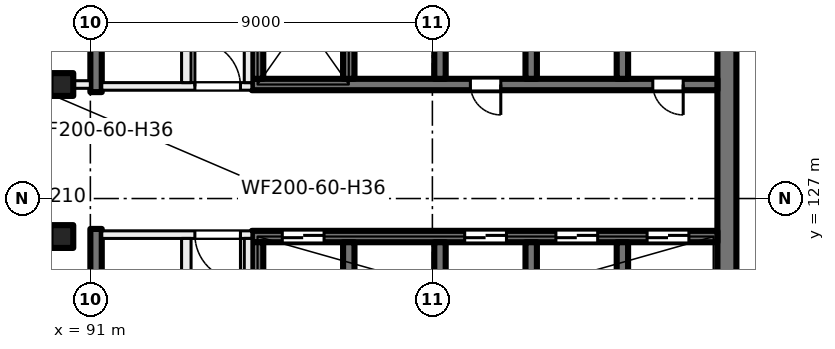
"""IFC4 building model, lengths in metres.
Left out: names, types, materials, properties, quantities, classifications, styles, units other than length and angle.
Written with IfcOpenShell. Run it as: python <this file> out.ifc"""

import sys

from ifc_helpers import new_model, si_unit, direction, frame, frame_2d, origin, origin_2d, place, context, subcontext, project, spatial, rectangle, extrude, element, fill, save


model = new_model("IFC4")
c1 = context("Model", 3, precision=1e-05, world=origin(), true_north=direction((0.0, 1.0)))
c2 = subcontext(c1, "Body", "Model", "MODEL_VIEW")
j1 = project(units=[si_unit("LENGTHUNIT", "METRE"), si_unit("PLANEANGLEUNIT", "RADIAN")], contexts=[c1])
p1 = place(None, origin())
s1 = spatial("IfcSite", under=j1, at=p1, CompositionType="ELEMENT")
p2 = place(p1, origin())
s2 = spatial("IfcBuilding", under=s1, at=p2, CompositionType="ELEMENT")
p3 = place(p2, frame((0.0, 0.0, 212.0)))
s3 = spatial("IfcBuildingStorey", under=s2, at=p3, CompositionType="ELEMENT", Elevation=212.0)
for number, where, z_axis, x_axis in (
    (1, (90.25, 130.0, 0.0), (0.0, 0.0, 1.0), (1.0, 0.0, 0.0)),
    (2, (90.25, 126.0, 0.0), (0.0, 0.0, 1.0), (1.0, 0.0, 0.0)),
):
    element("IfcColumn", number, at=place(p3, frame(where, z_axis=z_axis, x_axis=x_axis)), inside=s3, PredefinedType="COLUMN", context=c2, shape_type="SweptSolid", body=[
        extrude(rectangle(XDim=0.6, YDim=0.6, at=origin_2d()), origin(), (0.0, 0.0, 1.0), 4.0),
    ])
p4 = place(p3, frame((107.75, 135.2, 0.0), z_axis=(0.0, 0.0, 1.0), x_axis=(0.0, -1.0, 0.0)))
e3 = element("IfcWall", 3, at=p4, inside=s3, PredefinedType="SHEAR", context=c2, shape_type="SweptSolid", body=[
    extrude(rectangle(XDim=14.4, YDim=0.5, at=frame_2d((7.2, 0.0))), origin(), (0.0, 0.0, 1.0), 4.0),
])
p5 = place(p3, frame((107.5, 130.0, 0.0), z_axis=(0.0, 0.0, 1.0), x_axis=(-1.0, 0.0, 0.0)))
e4 = element("IfcWall", 4, at=p5, inside=s3, PredefinedType="SHEAR", context=c2, shape_type="SweptSolid", body=[
    extrude(rectangle(XDim=12.25, YDim=0.3, at=frame_2d((6.125, 0.0))), origin(), (0.0, 0.0, 1.0), 4.0),
])
p6 = place(p5, frame((0.9, 0.0, 0.0)))
e5 = element("IfcOpeningElement", 5, at=p6, cuts=e4, PredefinedType="OPENING", context=c2, shape_type="SweptSolid", body=[
    extrude(rectangle(XDim=0.8, YDim=2.1, at=frame_2d((0.4, 1.05))), frame((0.0, 0.16, 0.0), z_axis=(0.0, -1.0, 0.0), x_axis=(1.0, 0.0, 0.0)), (0.0, 0.0, 1.0), 0.32),
])
p7 = place(p5, frame((5.7, 0.0, 0.0)))
e6 = element("IfcOpeningElement", 6, at=p7, cuts=e4, PredefinedType="OPENING", context=c2, shape_type="SweptSolid", body=[
    extrude(rectangle(XDim=0.8, YDim=2.1, at=frame_2d((0.4, 1.05))), frame((0.0, 0.16, 0.0), z_axis=(0.0, -1.0, 0.0), x_axis=(1.0, 0.0, 0.0)), (0.0, 0.0, 1.0), 0.32),
])
for number, where, z_axis, x_axis in (
    (7, (105.0, 133.25, 0.0), (0.0, 0.0, 1.0), (0.0, -1.0, 0.0)),
    (8, (102.6, 133.25, 0.0), (0.0, 0.0, 1.0), (0.0, -1.0, 0.0)),
    (9, (100.2, 133.25, 0.0), (0.0, 0.0, 1.0), (0.0, -1.0, 0.0)),
    (10, (97.8, 133.25, 0.0), (0.0, 0.0, 1.0), (0.0, -1.0, 0.0)),
    (11, (95.4, 133.25, 0.0), (0.0, 0.0, 1.0), (0.0, -1.0, 0.0)),
):
    element("IfcWall", number, at=place(p3, frame(where, z_axis=z_axis, x_axis=x_axis)), inside=s3, PredefinedType="SHEAR", context=c2, shape_type="SweptSolid", body=[
        extrude(rectangle(XDim=3.1, YDim=0.3, at=frame_2d((1.55, 0.0))), origin(), (0.0, 0.0, 1.0), 4.0),
    ])
p8 = place(p3, frame((107.5, 126.0, 0.0), z_axis=(0.0, 0.0, 1.0), x_axis=(-1.0, 0.0, 0.0)))
e12 = element("IfcWall", 12, at=p8, inside=s3, PredefinedType="SHEAR", context=c2, shape_type="SweptSolid", body=[
    extrude(rectangle(XDim=12.25, YDim=0.3, at=frame_2d((6.125, 0.0))), origin(), (0.0, 0.0, 1.0), 4.0),
])
p9 = place(p8, frame((0.75, 0.0, 0.0)))
e13 = element("IfcOpeningElement", 13, at=p9, cuts=e12, PredefinedType="OPENING", context=c2, shape_type="SweptSolid", body=[
    extrude(rectangle(XDim=1.1, YDim=2.1, at=frame_2d((0.55, 1.05))), frame((0.0, 0.16, 0.0), z_axis=(0.0, -1.0, 0.0), x_axis=(1.0, 0.0, 0.0)), (0.0, 0.0, 1.0), 0.32),
])
p10 = place(p8, frame((3.15, 0.0, 0.0)))
e14 = element("IfcOpeningElement", 14, at=p10, cuts=e12, PredefinedType="OPENING", context=c2, shape_type="SweptSolid", body=[
    extrude(rectangle(XDim=1.1, YDim=2.1, at=frame_2d((0.55, 1.05))), frame((0.0, 0.16, 0.0), z_axis=(0.0, -1.0, 0.0), x_axis=(1.0, 0.0, 0.0)), (0.0, 0.0, 1.0), 0.32),
])
p11 = place(p8, frame((5.55, 0.0, 0.0)))
e15 = element("IfcOpeningElement", 15, at=p11, cuts=e12, PredefinedType="OPENING", context=c2, shape_type="SweptSolid", body=[
    extrude(rectangle(XDim=1.1, YDim=2.1, at=frame_2d((0.55, 1.05))), frame((0.0, 0.16, 0.0), z_axis=(0.0, -1.0, 0.0), x_axis=(1.0, 0.0, 0.0)), (0.0, 0.0, 1.0), 0.32),
])
p12 = place(p8, frame((10.35, 0.0, 0.0)))
e16 = element("IfcOpeningElement", 16, at=p12, cuts=e12, PredefinedType="OPENING", context=c2, shape_type="SweptSolid", body=[
    extrude(rectangle(XDim=1.1, YDim=2.1, at=frame_2d((0.55, 1.05))), frame((0.0, 0.16, 0.0), z_axis=(0.0, -1.0, 0.0), x_axis=(1.0, 0.0, 0.0)), (0.0, 0.0, 1.0), 0.32),
])
for number, where, z_axis, x_axis in (
    (17, (105.0, 125.85, 0.0), (0.0, 0.0, 1.0), (0.0, -1.0, 0.0)),
    (18, (102.6, 125.85, 0.0), (0.0, 0.0, 1.0), (0.0, -1.0, 0.0)),
    (19, (100.2, 125.85, 0.0), (0.0, 0.0, 1.0), (0.0, -1.0, 0.0)),
    (20, (97.8, 125.85, 0.0), (0.0, 0.0, 1.0), (0.0, -1.0, 0.0)),
    (21, (95.4, 125.85, 0.0), (0.0, 0.0, 1.0), (0.0, -1.0, 0.0)),
):
    element("IfcWall", number, at=place(p3, frame(where, z_axis=z_axis, x_axis=x_axis)), inside=s3, PredefinedType="SHEAR", context=c2, shape_type="SweptSolid", body=[
        extrude(rectangle(XDim=3.1, YDim=0.3, at=frame_2d((1.55, 0.0))), origin(), (0.0, 0.0, 1.0), 4.0),
    ])
for number, where, z_axis, x_axis in (
    (22, (91.15, 138.5, 0.0), (0.0, 0.0, 1.0), (0.0, -1.0, 0.0)),
    (23, (91.15, 126.2, 0.0), (0.0, 0.0, 1.0), (0.0, -1.0, 0.0)),
):
    element("IfcWall", number, at=place(p3, frame(where, z_axis=z_axis, x_axis=x_axis)), inside=s3, PredefinedType="SHEAR", context=c2, shape_type="SweptSolid", body=[
        extrude(rectangle(XDim=8.7, YDim=0.3, at=frame_2d((4.35, 0.0))), origin(), (0.0, 0.0, 1.0), 4.0),
    ])
p13 = place(p3, frame((95.25, 126.05, 0.0), z_axis=(0.0, 0.0, 1.0), x_axis=(-1.0, 0.0, 0.0)))
e24 = element("IfcWall", 24, at=p13, inside=s3, PredefinedType="PARTITIONING", context=c2, shape_type="SweptSolid", body=[
    extrude(rectangle(XDim=3.95, YDim=0.2, at=frame_2d((1.975, 0.0))), origin(), (0.0, 0.0, 1.0), 3.625),
])
p14 = place(p13, frame((0.3, 0.0, 0.0)))
e25 = element("IfcOpeningElement", 25, at=p14, cuts=e24, PredefinedType="OPENING", context=c2, shape_type="SweptSolid", body=[
    extrude(rectangle(XDim=1.2, YDim=2.1, at=frame_2d((0.6, 1.05))), frame((0.0, 0.11, 0.0), z_axis=(0.0, -1.0, 0.0), x_axis=(1.0, 0.0, 0.0)), (0.0, 0.0, 1.0), 0.22),
])
p15 = place(p3, frame((95.15, 117.5, 0.0), z_axis=(0.0, 0.0, 1.0), x_axis=(0.0, 1.0, 0.0)))
e26 = element("IfcWall", 26, at=p15, inside=s3, PredefinedType="PARTITIONING", context=c2, shape_type="SweptSolid", body=[
    extrude(rectangle(XDim=8.45, YDim=0.2, at=frame_2d((4.225, 0.0))), origin(), (0.0, 0.0, 1.0), 3.625),
])
p16 = place(p15, frame((1.725, 0.0, 0.0)))
e27 = element("IfcOpeningElement", 27, at=p16, cuts=e26, PredefinedType="OPENING", context=c2, shape_type="SweptSolid", body=[
    extrude(rectangle(XDim=1.5, YDim=2.1, at=frame_2d((0.75, 1.05))), frame((0.0, 0.11, 0.0), z_axis=(0.0, -1.0, 0.0), x_axis=(1.0, 0.0, 0.0)), (0.0, 0.0, 1.0), 0.22),
])
p17 = place(p3, frame((93.525, 117.5, 0.0), z_axis=(0.0, 0.0, 1.0), x_axis=(0.0, 1.0, 0.0)))
e28 = element("IfcWall", 28, at=p17, inside=s3, PredefinedType="PARTITIONING", context=c2, shape_type="SweptSolid", body=[
    extrude(rectangle(XDim=8.45, YDim=0.25, at=frame_2d((4.225, 0.0))), origin(), (0.0, 0.0, 1.0), 3.625),
])
p18 = place(p17, frame((5.26, 0.0, 0.0)))
e29 = element("IfcOpeningElement", 29, at=p18, cuts=e28, PredefinedType="OPENING", context=c2, shape_type="SweptSolid", body=[
    extrude(rectangle(XDim=0.8, YDim=2.1, at=frame_2d((0.4, 1.05))), frame((0.0, 0.135, 0.0), z_axis=(0.0, -1.0, 0.0), x_axis=(1.0, 0.0, 0.0)), (0.0, 0.0, 1.0), 0.27),
])
p19 = place(p17, frame((0.885, 0.0, 0.0)))
e30 = element("IfcOpeningElement", 30, at=p19, cuts=e28, PredefinedType="OPENING", context=c2, shape_type="SweptSolid", body=[
    extrude(rectangle(XDim=1.0, YDim=2.1, at=frame_2d((0.5, 1.05))), frame((0.0, 0.135, 0.0), z_axis=(0.0, -1.0, 0.0), x_axis=(1.0, 0.0, 0.0)), (0.0, 0.0, 1.0), 0.27),
])
p20 = place(p3, frame((91.3, 129.95, 0.0), z_axis=(0.0, 0.0, 1.0), x_axis=(1.0, 0.0, 0.0)))
e31 = element("IfcWall", 31, at=p20, inside=s3, PredefinedType="PARTITIONING", context=c2, shape_type="SweptSolid", body=[
    extrude(rectangle(XDim=3.95, YDim=0.2, at=frame_2d((1.975, 0.0))), origin(), (0.0, 0.0, 1.0), 3.625),
])
p21 = place(p20, frame((2.45, 0.0, 0.0)))
e32 = element("IfcOpeningElement", 32, at=p21, cuts=e31, PredefinedType="OPENING", context=c2, shape_type="SweptSolid", body=[
    extrude(rectangle(XDim=1.2, YDim=2.1, at=frame_2d((0.6, 1.05))), frame((0.0, 0.11, 0.0), z_axis=(0.0, -1.0, 0.0), x_axis=(1.0, 0.0, 0.0)), (0.0, 0.0, 1.0), 0.22),
])
p22 = place(p3, frame((95.15, 130.05, 0.0), z_axis=(0.0, 0.0, 1.0), x_axis=(0.0, 1.0, 0.0)))
e33 = element("IfcWall", 33, at=p22, inside=s3, PredefinedType="PARTITIONING", context=c2, shape_type="SweptSolid", body=[
    extrude(rectangle(XDim=8.45, YDim=0.2, at=frame_2d((4.225, 0.0))), origin(), (0.0, 0.0, 1.0), 3.625),
])
p23 = place(p22, frame((5.225, 0.0, 0.0)))
e34 = element("IfcOpeningElement", 34, at=p23, cuts=e33, PredefinedType="OPENING", context=c2, shape_type="SweptSolid", body=[
    extrude(rectangle(XDim=1.5, YDim=2.1, at=frame_2d((0.75, 1.05))), frame((0.0, 0.11, 0.0), z_axis=(0.0, -1.0, 0.0), x_axis=(1.0, 0.0, 0.0)), (0.0, 0.0, 1.0), 0.22),
])
p24 = place(p3, frame((93.525, 130.05, 0.0), z_axis=(0.0, 0.0, 1.0), x_axis=(0.0, 1.0, 0.0)))
e35 = element("IfcWall", 35, at=p24, inside=s3, PredefinedType="PARTITIONING", context=c2, shape_type="SweptSolid", body=[
    extrude(rectangle(XDim=8.45, YDim=0.25, at=frame_2d((4.225, 0.0))), origin(), (0.0, 0.0, 1.0), 3.625),
])
p25 = place(p24, frame((1.69, 0.0, 0.0)))
e36 = element("IfcOpeningElement", 36, at=p25, cuts=e35, PredefinedType="OPENING", context=c2, shape_type="SweptSolid", body=[
    extrude(rectangle(XDim=0.8, YDim=2.1, at=frame_2d((0.4, 1.05))), frame((0.0, 0.135, 0.0), z_axis=(0.0, -1.0, 0.0), x_axis=(1.0, 0.0, 0.0)), (0.0, 0.0, 1.0), 0.27),
])
p26 = place(p24, frame((5.965, 0.0, 0.0)))
e37 = element("IfcOpeningElement", 37, at=p26, cuts=e35, PredefinedType="OPENING", context=c2, shape_type="SweptSolid", body=[
    extrude(rectangle(XDim=0.8, YDim=2.1, at=frame_2d((0.4, 1.05))), frame((0.0, 0.135, 0.0), z_axis=(0.0, -1.0, 0.0), x_axis=(1.0, 0.0, 0.0)), (0.0, 0.0, 1.0), 0.27),
])
p27 = place(p3, frame((87.7, 130.0, 0.0), z_axis=(0.0, 0.0, 1.0), x_axis=(1.0, 0.0, 0.0)))
e38 = element("IfcWall", 38, at=p27, inside=s3, PredefinedType="PARTITIONING", context=c2, shape_type="SweptSolid", body=[
    extrude(rectangle(XDim=3.3, YDim=0.2, at=frame_2d((1.65, 0.0))), origin(), (0.0, 0.0, 1.0), 3.625),
])
p28 = place(p9, origin())
e39 = element("IfcDoor", 39, at=p28, inside=s3, OperationType="DOUBLE_DOOR_SLIDING", PredefinedType="DOOR", context=c2, shape_type="SweptSolid", body=[
    extrude(rectangle(XDim=1.1, YDim=2.1, at=frame_2d((0.55, 1.05))), frame((0.0, 0.025, 0.0), z_axis=(0.0, -1.0, 0.0), x_axis=(1.0, 0.0, 0.0)), (0.0, 0.0, 1.0), 0.05),
])
fill(e13, e39)
p29 = place(p10, origin())
e40 = element("IfcDoor", 40, at=p29, inside=s3, OperationType="DOUBLE_DOOR_SLIDING", PredefinedType="DOOR", context=c2, shape_type="SweptSolid", body=[
    extrude(rectangle(XDim=1.1, YDim=2.1, at=frame_2d((0.55, 1.05))), frame((0.0, 0.025, 0.0), z_axis=(0.0, -1.0, 0.0), x_axis=(1.0, 0.0, 0.0)), (0.0, 0.0, 1.0), 0.05),
])
fill(e14, e40)
p30 = place(p11, origin())
e41 = element("IfcDoor", 41, at=p30, inside=s3, OperationType="DOUBLE_DOOR_SLIDING", PredefinedType="DOOR", context=c2, shape_type="SweptSolid", body=[
    extrude(rectangle(XDim=1.1, YDim=2.1, at=frame_2d((0.55, 1.05))), frame((0.0, 0.025, 0.0), z_axis=(0.0, -1.0, 0.0), x_axis=(1.0, 0.0, 0.0)), (0.0, 0.0, 1.0), 0.05),
])
fill(e15, e41)
p31 = place(p12, origin())
e42 = element("IfcDoor", 42, at=p31, inside=s3, OperationType="DOUBLE_DOOR_SLIDING", PredefinedType="DOOR", context=c2, shape_type="SweptSolid", body=[
    extrude(rectangle(XDim=1.1, YDim=2.1, at=frame_2d((0.55, 1.05))), frame((0.0, 0.025, 0.0), z_axis=(0.0, -1.0, 0.0), x_axis=(1.0, 0.0, 0.0)), (0.0, 0.0, 1.0), 0.05),
])
fill(e16, e42)
p32 = place(p6, origin())
e43 = element("IfcDoor", 43, at=p32, inside=s3, OperationType="SINGLE_SWING_LEFT", PredefinedType="DOOR", context=c2, shape_type="SweptSolid", body=[
    extrude(rectangle(XDim=0.8, YDim=2.1, at=frame_2d((0.4, 1.05))), frame((0.0, 0.025, 0.0), z_axis=(0.0, -1.0, 0.0), x_axis=(1.0, 0.0, 0.0)), (0.0, 0.0, 1.0), 0.05),
])
fill(e5, e43)
p33 = place(p7, origin())
e44 = element("IfcDoor", 44, at=p33, inside=s3, OperationType="SINGLE_SWING_RIGHT", PredefinedType="DOOR", context=c2, shape_type="SweptSolid", body=[
    extrude(rectangle(XDim=0.8, YDim=2.1, at=frame_2d((0.4, 1.05))), frame((0.0, 0.025, 0.0), z_axis=(0.0, -1.0, 0.0), x_axis=(1.0, 0.0, 0.0)), (0.0, 0.0, 1.0), 0.05),
])
fill(e6, e44)
p34 = place(p14, origin())
e45 = element("IfcDoor", 45, at=p34, inside=s3, OperationType="DOUBLE_DOOR_SINGLE_SWING", PredefinedType="DOOR", context=c2, shape_type="SweptSolid", body=[
    extrude(rectangle(XDim=1.2, YDim=2.1, at=frame_2d((0.6, 1.05))), frame((0.0, 0.025, 0.0), z_axis=(0.0, -1.0, 0.0), x_axis=(1.0, 0.0, 0.0)), (0.0, 0.0, 1.0), 0.05),
])
fill(e25, e45)
p35 = place(p21, origin())
e46 = element("IfcDoor", 46, at=p35, inside=s3, OperationType="DOUBLE_DOOR_SINGLE_SWING", PredefinedType="DOOR", context=c2, shape_type="SweptSolid", body=[
    extrude(rectangle(XDim=1.2, YDim=2.1, at=frame_2d((0.6, 1.05))), frame((0.0, 0.025, 0.0), z_axis=(0.0, -1.0, 0.0), x_axis=(1.0, 0.0, 0.0)), (0.0, 0.0, 1.0), 0.05),
])
fill(e32, e46)
save(model, sys.argv[1])
